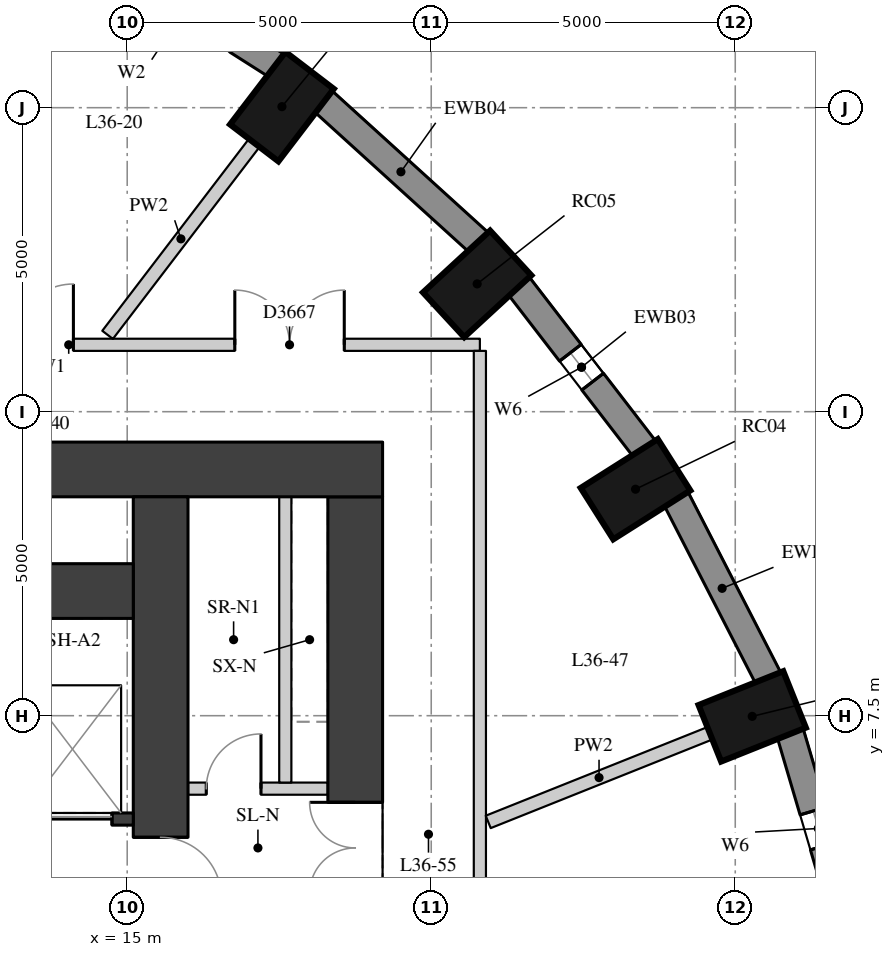
"""IFC4 building model, lengths in metres.
Left out: names, types, materials, properties, quantities, classifications, styles, units other than length and angle.
Written with IfcOpenShell. Run it as: python <this file> out.ifc"""

import sys

from ifc_helpers import new_model, si_unit, direction, frame, frame_2d, origin, origin_2d, place, context, subcontext, project, spatial, rectangle, extrude, element, fill, save


model = new_model("IFC4")
c1 = context("Model", 3, precision=1e-05, world=origin(), true_north=direction((0.0, 1.0)))
c2 = subcontext(c1, "Body", "Model", "MODEL_VIEW")
j1 = project(units=[si_unit("LENGTHUNIT", "METRE"), si_unit("PLANEANGLEUNIT", "RADIAN")], contexts=[c1])
p1 = place(None, origin())
s1 = spatial("IfcSite", under=j1, at=p1, CompositionType="ELEMENT")
p2 = place(p1, origin())
s2 = spatial("IfcBuilding", under=s1, at=p2, CompositionType="ELEMENT")
p3 = place(p2, frame((0.0, 0.0, 128.5)))
s3 = spatial("IfcBuildingStorey", under=s2, at=p3, CompositionType="ELEMENT", Elevation=128.5)
for number, where, z_axis, x_axis in (
    (1, (25.279, 7.489, 0.0), (0.0, 0.0, 1.0), (0.929, 0.371, 0.0)),
    (2, (23.36, 11.225, 0.0), (0.0, 0.0, 1.0), (0.845, 0.536, 0.0)),
    (3, (20.755, 14.602, 0.0), (0.0, 0.0, 1.0), (0.735, 0.678, 0.0)),
    (4, (17.545, 17.517, 0.0), (0.0, 0.0, 1.0), (0.607, 0.795, 0.0)),
):
    element("IfcColumn", number, at=place(p3, frame(where, z_axis=z_axis, x_axis=x_axis)), inside=s3, PredefinedType="COLUMN", context=c2, shape_type="SweptSolid", body=[
        extrude(rectangle(XDim=1.5, YDim=1.0, at=origin_2d()), origin(), (0.0, 0.0, 1.0), 3.3),
    ])
p4 = place(p3, frame((26.832, 4.069, 0.0), z_axis=(0.0, 0.0, 1.0), x_axis=(-0.283002902729, 0.959119052593, 0.0)))
e5 = element("IfcWall", 5, at=p4, inside=s3, PredefinedType="SOLIDWALL", context=c2, shape_type="SweptSolid", body=[
    extrude(rectangle(XDim=3.286, YDim=0.45, at=frame_2d((1.643, 0.0))), origin(), (0.0, 0.0, 1.0), 3.02),
])
p5 = place(p4, frame((1.343, 0.0, 0.4)))
e6 = element("IfcOpeningElement", 6, at=p5, cuts=e5, PredefinedType="OPENING", context=c2, shape_type="SweptSolid", body=[
    extrude(rectangle(XDim=0.6, YDim=1.75, at=frame_2d((0.3, 0.875))), frame((0.0, 0.235, 0.0), z_axis=(0.0, -1.0, 0.0), x_axis=(1.0, 0.0, 0.0)), (0.0, 0.0, 1.0), 0.47),
])
p6 = place(p3, frame((25.545, 8.112, 0.0), z_axis=(0.0, 0.0, 1.0), x_axis=(-0.456828186229, 0.889554949549, 0.0)))
e7 = element("IfcWall", 7, at=p6, inside=s3, PredefinedType="SOLIDWALL", context=c2, shape_type="SweptSolid", body=[
    extrude(rectangle(XDim=3.333, YDim=0.45, at=frame_2d((1.667, 0.0))), origin(), (0.0, 0.0, 1.0), 3.02),
])
p7 = place(p3, frame((23.508, 11.887, 0.0), z_axis=(0.0, 0.0, 1.0), x_axis=(-0.610693945156, 0.791866721961, 0.0)))
e8 = element("IfcWall", 8, at=p7, inside=s3, PredefinedType="SOLIDWALL", context=c2, shape_type="SweptSolid", body=[
    extrude(rectangle(XDim=3.395, YDim=0.45, at=frame_2d((1.697, 0.0))), origin(), (0.0, 0.0, 1.0), 3.02),
])
p8 = place(p7, frame((1.397, 0.0, 0.4)))
e9 = element("IfcOpeningElement", 9, at=p8, cuts=e8, PredefinedType="OPENING", context=c2, shape_type="SweptSolid", body=[
    extrude(rectangle(XDim=0.6, YDim=1.75, at=frame_2d((0.3, 0.875))), frame((0.0, 0.235, 0.0), z_axis=(0.0, -1.0, 0.0), x_axis=(1.0, 0.0, 0.0)), (0.0, 0.0, 1.0), 0.47),
])
p9 = place(p3, frame((20.784, 15.281, 0.0), z_axis=(0.0, 0.0, 1.0), x_axis=(-0.74032902847, 0.672244694739, 0.0)))
e10 = element("IfcWall", 10, at=p9, inside=s3, PredefinedType="SOLIDWALL", context=c2, shape_type="SweptSolid", body=[
    extrude(rectangle(XDim=3.464, YDim=0.45, at=frame_2d((1.732, 0.0))), origin(), (0.0, 0.0, 1.0), 3.02),
])
p10 = place(p3, frame((17.456, 18.192, 0.0), z_axis=(0.0, 0.0, 1.0), x_axis=(-0.843880549131, 0.536531097699, 0.0)))
e11 = element("IfcWall", 11, at=p10, inside=s3, PredefinedType="SOLIDWALL", context=c2, shape_type="SweptSolid", body=[
    extrude(rectangle(XDim=3.532, YDim=0.45, at=frame_2d((1.766, 0.0))), origin(), (0.0, 0.0, 1.0), 3.02),
])
p11 = place(p10, frame((0.766, 0.0, 0.4)))
e12 = element("IfcOpeningElement", 12, at=p11, cuts=e11, PredefinedType="OPENING", context=c2, shape_type="SweptSolid", body=[
    extrude(rectangle(XDim=2.0, YDim=1.75, at=frame_2d((1.0, 0.875))), frame((0.0, 0.235, 0.0), z_axis=(0.0, -1.0, 0.0), x_axis=(1.0, 0.0, 0.0)), (0.0, 0.0, 1.0), 0.47),
])
p12 = place(p3, frame((18.75, -11.1, 0.0), z_axis=(0.0, 0.0, 1.0), x_axis=(0.0, 1.0, 0.0)))
e13 = element("IfcWall", 13, at=p12, inside=s3, PredefinedType="SHEAR", context=c2, shape_type="SweptSolid", body=[
    extrude(rectangle(XDim=22.2, YDim=0.9, at=frame_2d((11.1, 0.0))), origin(), (0.0, 0.0, 1.0), 3.02),
])
p13 = place(p12, frame((15.675, 0.0, 0.0)))
e14 = element("IfcOpeningElement", 14, at=p13, cuts=e13, PredefinedType="OPENING", context=c2, shape_type="SweptSolid", body=[
    extrude(rectangle(XDim=1.5, YDim=2.1, at=frame_2d((0.75, 1.05))), frame((0.0, 0.46, 0.0), z_axis=(0.0, -1.0, 0.0), x_axis=(1.0, 0.0, 0.0)), (0.0, 0.0, 1.0), 0.92),
])
p14 = place(p12, frame((4.775, 0.0, 0.0)))
e15 = element("IfcOpeningElement", 15, at=p14, cuts=e13, PredefinedType="OPENING", context=c2, shape_type="SweptSolid", body=[
    extrude(rectangle(XDim=1.5, YDim=2.1, at=frame_2d((0.75, 1.05))), frame((0.0, 0.46, 0.0), z_axis=(0.0, -1.0, 0.0), x_axis=(1.0, 0.0, 0.0)), (0.0, 0.0, 1.0), 0.92),
])
p15 = place(p3, frame((4.0, 11.55, 0.0), z_axis=(0.0, 0.0, 1.0), x_axis=(1.0, 0.0, 0.0)))
e16 = element("IfcWall", 16, at=p15, inside=s3, PredefinedType="SHEAR", context=c2, shape_type="SweptSolid", body=[
    extrude(rectangle(XDim=15.2, YDim=0.9, at=frame_2d((7.6, 0.0))), origin(), (0.0, 0.0, 1.0), 3.02),
])
p16 = place(p3, frame((15.55, -11.1, 0.0), z_axis=(0.0, 0.0, 1.0), x_axis=(0.0, 1.0, 0.0)))
e17 = element("IfcWall", 17, at=p16, inside=s3, PredefinedType="SHEAR", context=c2, shape_type="SweptSolid", body=[
    extrude(rectangle(XDim=22.2, YDim=0.9, at=frame_2d((11.1, 0.0))), origin(), (0.0, 0.0, 1.0), 3.02),
])
p17 = place(p16, frame((15.6, 0.0, 0.0)))
e18 = element("IfcOpeningElement", 18, at=p17, cuts=e17, PredefinedType="OPENING", context=c2, shape_type="SweptSolid", body=[
    extrude(rectangle(XDim=1.0, YDim=2.1, at=frame_2d((0.5, 1.05))), frame((0.0, 0.46, 0.0), z_axis=(0.0, -1.0, 0.0), x_axis=(1.0, 0.0, 0.0)), (0.0, 0.0, 1.0), 0.92),
])
p18 = place(p16, frame((5.6, 0.0, 0.0)))
e19 = element("IfcOpeningElement", 19, at=p18, cuts=e17, PredefinedType="OPENING", context=c2, shape_type="SweptSolid", body=[
    extrude(rectangle(XDim=1.0, YDim=2.1, at=frame_2d((0.5, 1.05))), frame((0.0, 0.46, 0.0), z_axis=(0.0, -1.0, 0.0), x_axis=(1.0, 0.0, 0.0)), (0.0, 0.0, 1.0), 0.92),
])
p19 = place(p3, frame((4.9, 9.55, 0.0), z_axis=(0.0, 0.0, 1.0), x_axis=(1.0, 0.0, 0.0)))
e20 = element("IfcWall", 20, at=p19, inside=s3, PredefinedType="SHEAR", context=c2, shape_type="SweptSolid", body=[
    extrude(rectangle(XDim=10.2, YDim=0.9, at=frame_2d((5.1, 0.0))), origin(), (0.0, 0.0, 1.0), 3.02),
])
p20 = place(p3, frame((4.9, 5.8, 0.0), z_axis=(0.0, 0.0, 1.0), x_axis=(1.0, 0.0, 0.0)))
e21 = element("IfcWall", 21, at=p20, inside=s3, PredefinedType="SHEAR", context=c2, shape_type="SweptSolid", body=[
    extrude(rectangle(XDim=10.2, YDim=0.2, at=frame_2d((5.1, 0.0))), origin(), (0.0, 0.0, 1.0), 3.02),
])
p21 = place(p20, frame((6.75, 0.0, 0.0)))
e22 = element("IfcOpeningElement", 22, at=p21, cuts=e21, PredefinedType="OPENING", context=c2, shape_type="SweptSolid", body=[
    extrude(rectangle(XDim=1.1, YDim=2.1, at=frame_2d((0.55, 1.05))), frame((0.0, 0.11, 0.0), z_axis=(0.0, -1.0, 0.0), x_axis=(1.0, 0.0, 0.0)), (0.0, 0.0, 1.0), 0.22),
])
p22 = place(p20, frame((8.75, 0.0, 0.0)))
e23 = element("IfcOpeningElement", 23, at=p22, cuts=e21, PredefinedType="OPENING", context=c2, shape_type="SweptSolid", body=[
    extrude(rectangle(XDim=1.1, YDim=2.1, at=frame_2d((0.55, 1.05))), frame((0.0, 0.11, 0.0), z_axis=(0.0, -1.0, 0.0), x_axis=(1.0, 0.0, 0.0)), (0.0, 0.0, 1.0), 0.22),
])
p23 = place(p3, frame((16.0, 6.3, 0.0), z_axis=(0.0, 0.0, 1.0), x_axis=(1.0, 0.0, 0.0)))
e24 = element("IfcWall", 24, at=p23, inside=s3, PredefinedType="PARTITIONING", context=c2, shape_type="SweptSolid", body=[
    extrude(rectangle(XDim=2.3, YDim=0.2, at=frame_2d((1.15, 0.0))), origin(), (0.0, 0.0, 1.0), 3.02),
])
p24 = place(p23, frame((0.3, 0.0, 0.0)))
e25 = element("IfcOpeningElement", 25, at=p24, cuts=e24, PredefinedType="OPENING", context=c2, shape_type="SweptSolid", body=[
    extrude(rectangle(XDim=0.9, YDim=2.1, at=frame_2d((0.45, 1.05))), frame((0.0, 0.11, 0.0), z_axis=(0.0, -1.0, 0.0), x_axis=(1.0, 0.0, 0.0)), (0.0, 0.0, 1.0), 0.22),
])
p25 = place(p3, frame((17.6, 6.4, 0.0), z_axis=(0.0, 0.0, 1.0), x_axis=(0.0, 1.0, 0.0)))
e26 = element("IfcWall", 26, at=p25, inside=s3, PredefinedType="PARTITIONING", context=c2, shape_type="SweptSolid", body=[
    extrude(rectangle(XDim=4.7, YDim=0.2, at=frame_2d((2.35, 0.0))), origin(), (0.0, 0.0, 1.0), 3.02),
])
p26 = place(p3, frame((7.276, 13.6, 0.0), z_axis=(0.0, 0.0, 1.0), x_axis=(1.0, 0.0, 0.0)))
e27 = element("IfcWall", 27, at=p26, inside=s3, PredefinedType="PARTITIONING", context=c2, shape_type="SweptSolid", body=[
    extrude(rectangle(XDim=13.524, YDim=0.2, at=frame_2d((6.762, 0.0))), origin(), (0.0, 0.0, 1.0), 3.02),
])
p27 = place(p26, frame((5.839, 0.0, 0.0)))
e28 = element("IfcOpeningElement", 28, at=p27, cuts=e27, PredefinedType="OPENING", context=c2, shape_type="SweptSolid", body=[
    extrude(rectangle(XDim=1.0, YDim=2.1, at=frame_2d((0.5, 1.05))), frame((0.0, 0.11, 0.0), z_axis=(0.0, -1.0, 0.0), x_axis=(1.0, 0.0, 0.0)), (0.0, 0.0, 1.0), 0.22),
])
p28 = place(p26, frame((1.073, 0.0, 0.0)))
e29 = element("IfcOpeningElement", 29, at=p28, cuts=e27, PredefinedType="OPENING", context=c2, shape_type="SweptSolid", body=[
    extrude(rectangle(XDim=0.9, YDim=2.1, at=frame_2d((0.45, 1.05))), frame((0.0, 0.11, 0.0), z_axis=(0.0, -1.0, 0.0), x_axis=(1.0, 0.0, 0.0)), (0.0, 0.0, 1.0), 0.22),
])
p29 = place(p26, frame((9.494, 0.0, 0.0)))
e30 = element("IfcOpeningElement", 30, at=p29, cuts=e27, PredefinedType="OPENING", context=c2, shape_type="SweptSolid", body=[
    extrude(rectangle(XDim=1.8, YDim=2.1, at=frame_2d((0.9, 1.05))), frame((0.0, 0.11, 0.0), z_axis=(0.0, -1.0, 0.0), x_axis=(1.0, 0.0, 0.0)), (0.0, 0.0, 1.0), 0.22),
])
p30 = place(p3, frame((20.8, 13.5, 0.0), z_axis=(0.0, 0.0, 1.0), x_axis=(0.0, -1.0, 0.0)))
e31 = element("IfcWall", 31, at=p30, inside=s3, PredefinedType="PARTITIONING", context=c2, shape_type="SweptSolid", body=[
    extrude(rectangle(XDim=27.1, YDim=0.2, at=frame_2d((13.55, 0.0))), origin(), (0.0, 0.0, 1.0), 3.02),
])
p31 = place(p30, frame((22.844, 0.0, 0.0)))
e32 = element("IfcOpeningElement", 32, at=p31, cuts=e31, PredefinedType="OPENING", context=c2, shape_type="SweptSolid", body=[
    extrude(rectangle(XDim=1.8, YDim=2.1, at=frame_2d((0.9, 1.05))), frame((0.0, 0.11, 0.0), z_axis=(0.0, -1.0, 0.0), x_axis=(1.0, 0.0, 0.0)), (0.0, 0.0, 1.0), 0.22),
])
p32 = place(p30, frame((16.35, 0.0, 0.0)))
e33 = element("IfcOpeningElement", 33, at=p32, cuts=e31, PredefinedType="OPENING", context=c2, shape_type="SweptSolid", body=[
    extrude(rectangle(XDim=1.8, YDim=2.1, at=frame_2d((0.9, 1.05))), frame((0.0, 0.11, 0.0), z_axis=(0.0, -1.0, 0.0), x_axis=(1.0, 0.0, 0.0)), (0.0, 0.0, 1.0), 0.22),
])
p33 = place(p30, frame((10.051, 0.0, 0.0)))
e34 = element("IfcOpeningElement", 34, at=p33, cuts=e31, PredefinedType="OPENING", context=c2, shape_type="SweptSolid", body=[
    extrude(rectangle(XDim=1.8, YDim=2.1, at=frame_2d((0.9, 1.05))), frame((0.0, 0.11, 0.0), z_axis=(0.0, -1.0, 0.0), x_axis=(1.0, 0.0, 0.0)), (0.0, 0.0, 1.0), 0.22),
])
p34 = place(p3, frame((24.583, 7.21, 0.0), z_axis=(0.0, 0.0, 1.0), x_axis=(-0.928528147853, -0.371262008083, 0.0)))
e35 = element("IfcWall", 35, at=p34, inside=s3, PredefinedType="PARTITIONING", context=c2, shape_type="SweptSolid", body=[
    extrude(rectangle(XDim=3.926, YDim=0.22, at=frame_2d((1.963, 0.0))), origin(), (0.0, 0.0, 1.0), 3.02),
])
p35 = place(p3, frame((17.089, 16.921, 0.0), z_axis=(0.0, 0.0, 1.0), x_axis=(-0.607055443677, -0.794659479464, 0.0)))
e36 = element("IfcWall", 36, at=p35, inside=s3, PredefinedType="PARTITIONING", context=c2, shape_type="SweptSolid", body=[
    extrude(rectangle(XDim=3.973, YDim=0.22, at=frame_2d((1.987, 0.0))), origin(), (0.0, 0.0, 1.0), 3.02),
])
p36 = place(p5, origin())
e37 = element("IfcWindow", 37, at=p36, inside=s3, PartitioningType="SINGLE_PANEL", PredefinedType="WINDOW", context=c2, shape_type="SweptSolid", body=[
    extrude(rectangle(XDim=0.6, YDim=1.75, at=frame_2d((0.3, 0.875))), frame((0.0, 0.035, 0.0), z_axis=(0.0, -1.0, 0.0), x_axis=(1.0, 0.0, 0.0)), (0.0, 0.0, 1.0), 0.06),
])
fill(e6, e37)
p37 = place(p8, origin())
e38 = element("IfcWindow", 38, at=p37, inside=s3, PartitioningType="SINGLE_PANEL", PredefinedType="WINDOW", context=c2, shape_type="SweptSolid", body=[
    extrude(rectangle(XDim=0.6, YDim=1.75, at=frame_2d((0.3, 0.875))), frame((0.0, 0.035, 0.0), z_axis=(0.0, -1.0, 0.0), x_axis=(1.0, 0.0, 0.0)), (0.0, 0.0, 1.0), 0.06),
])
fill(e9, e38)
p38 = place(p13, origin())
e39 = element("IfcDoor", 39, at=p38, inside=s3, OperationType="DOUBLE_DOOR_SINGLE_SWING", PredefinedType="DOOR", context=c2, shape_type="SweptSolid", body=[
    extrude(rectangle(XDim=1.5, YDim=2.1, at=frame_2d((0.75, 1.05))), frame((0.0, 0.025, 0.0), z_axis=(0.0, -1.0, 0.0), x_axis=(1.0, 0.0, 0.0)), (0.0, 0.0, 1.0), 0.05),
])
fill(e14, e39)
p39 = place(p22, origin())
e40 = element("IfcDoor", 40, at=p39, inside=s3, OperationType="DOUBLE_DOOR_SLIDING", PredefinedType="DOOR", context=c2, shape_type="SweptSolid", body=[
    extrude(rectangle(XDim=1.1, YDim=2.1, at=frame_2d((0.55, 1.05))), frame((0.0, 0.025, 0.0), z_axis=(0.0, -1.0, 0.0), x_axis=(1.0, 0.0, 0.0)), (0.0, 0.0, 1.0), 0.05),
])
fill(e23, e40)
p40 = place(p17, origin())
e41 = element("IfcDoor", 41, at=p40, inside=s3, OperationType="SINGLE_SWING_RIGHT", PredefinedType="DOOR", context=c2, shape_type="SweptSolid", body=[
    extrude(rectangle(XDim=1.0, YDim=2.1, at=frame_2d((0.5, 1.05))), frame((0.0, 0.025, 0.0), z_axis=(0.0, -1.0, 0.0), x_axis=(1.0, 0.0, 0.0)), (0.0, 0.0, 1.0), 0.05),
])
fill(e18, e41)
p41 = place(p24, origin())
e42 = element("IfcDoor", 42, at=p41, inside=s3, OperationType="SINGLE_SWING_RIGHT", PredefinedType="DOOR", context=c2, shape_type="SweptSolid", body=[
    extrude(rectangle(XDim=0.9, YDim=2.1, at=frame_2d((0.45, 1.05))), frame((0.0, 0.025, 0.0), z_axis=(0.0, -1.0, 0.0), x_axis=(1.0, 0.0, 0.0)), (0.0, 0.0, 1.0), 0.05),
])
fill(e25, e42)
p42 = place(p27, origin())
e43 = element("IfcDoor", 43, at=p42, inside=s3, OperationType="SINGLE_SWING_RIGHT", PredefinedType="DOOR", context=c2, shape_type="SweptSolid", body=[
    extrude(rectangle(XDim=1.0, YDim=2.1, at=frame_2d((0.5, 1.05))), frame((0.0, 0.025, 0.0), z_axis=(0.0, -1.0, 0.0), x_axis=(1.0, 0.0, 0.0)), (0.0, 0.0, 1.0), 0.05),
])
fill(e28, e43)
p43 = place(p29, origin())
e44 = element("IfcDoor", 44, at=p43, inside=s3, OperationType="DOUBLE_DOOR_SINGLE_SWING", PredefinedType="DOOR", context=c2, shape_type="SweptSolid", body=[
    extrude(rectangle(XDim=1.8, YDim=2.1, at=frame_2d((0.9, 1.05))), frame((0.0, 0.025, 0.0), z_axis=(0.0, -1.0, 0.0), x_axis=(1.0, 0.0, 0.0)), (0.0, 0.0, 1.0), 0.05),
])
fill(e30, e44)
save(model, sys.argv[1])
